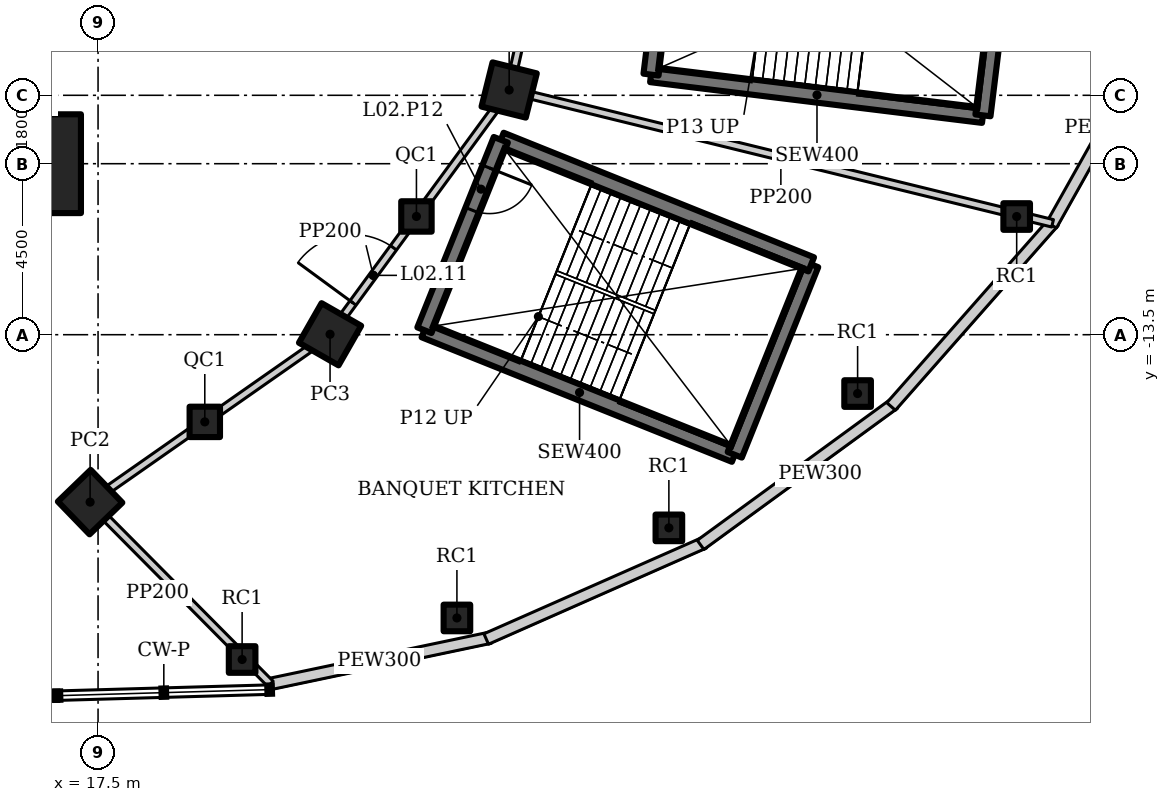
"""IFC4 building model, lengths in metres.
Left out: names, types, materials, properties, quantities, classifications, styles, units other than length and angle.
Written with IfcOpenShell. Run it as: python <this file> out.ifc"""

import sys

from ifc_helpers import new_model, si_unit, direction, frame, frame_2d, origin, origin_2d, place, context, subcontext, project, spatial, rectangle, hollow_rectangle, extrude, element, fill, save


model = new_model("IFC4")
c1 = context("Model", 3, precision=1e-05, world=origin(), true_north=direction((0.0, 1.0)))
c2 = subcontext(c1, "Body", "Model", "MODEL_VIEW")
j1 = project(units=[si_unit("LENGTHUNIT", "METRE"), si_unit("PLANEANGLEUNIT", "RADIAN")], contexts=[c1])
p1 = place(None, origin())
s1 = spatial("IfcSite", under=j1, at=p1, CompositionType="ELEMENT")
p2 = place(p1, origin())
s2 = spatial("IfcBuilding", under=s1, at=p2, CompositionType="ELEMENT")
p3 = place(p2, frame((0.0, 0.0, 14.5)))
s3 = spatial("IfcBuildingStorey", under=s2, at=p3, CompositionType="ELEMENT", Elevation=14.5)
p4 = place(p3, frame((15.75, -9.0, 0.0), z_axis=(0.0, 0.0, 1.0), x_axis=(1.0, 0.0, 0.0)))
e1 = element("IfcColumn", 1, at=p4, inside=s3, PredefinedType="COLUMN", context=c2, shape_type="SweptSolid", body=[
    extrude(hollow_rectangle(XDim=2.6, YDim=2.6, WallThickness=0.13, at=origin_2d()), origin(), (0.0, 0.0, 1.0), 7.5),
])
p5 = place(p3, frame((17.291, -17.905, 0.0), z_axis=(0.0, 0.0, 1.0), x_axis=(0.719339800339, 0.694658370459, 0.0)))
e2 = element("IfcColumn", 2, at=p5, inside=s3, PredefinedType="COLUMN", context=c2, shape_type="SweptSolid", body=[
    extrude(hollow_rectangle(XDim=1.2, YDim=1.2, WallThickness=0.1, at=origin_2d()), origin(), (0.0, 0.0, 1.0), 7.5),
])
p6 = place(p3, frame((23.605, -13.489, 0.0), z_axis=(0.0, 0.0, 1.0), x_axis=(0.496139221777, 0.86824298017, 0.0)))
e3 = element("IfcColumn", 3, at=p6, inside=s3, PredefinedType="COLUMN", context=c2, shape_type="SweptSolid", body=[
    extrude(hollow_rectangle(XDim=1.2, YDim=1.2, WallThickness=0.12, at=origin_2d()), origin(), (0.0, 0.0, 1.0), 7.5),
])
p7 = place(p3, frame((28.318, -7.06, 0.0), z_axis=(0.0, 0.0, 1.0), x_axis=(0.2419218956, 0.970295726276, 0.0)))
e4 = element("IfcColumn", 4, at=p7, inside=s3, PredefinedType="COLUMN", context=c2, shape_type="SweptSolid", body=[
    extrude(hollow_rectangle(XDim=1.2, YDim=1.2, WallThickness=0.1, at=origin_2d()), origin(), (0.0, 0.0, 1.0), 7.5),
])
for number, where, z_axis, x_axis in (
    (5, (20.309, -15.794, 0.0), (0.0, 0.0, 1.0), (1.0, 0.0, 0.0)),
    (6, (25.878, -10.388, 0.0), (0.0, 0.0, 1.0), (1.0, 0.0, 0.0)),
):
    element("IfcColumn", number, at=place(p3, frame(where, z_axis=z_axis, x_axis=x_axis)), inside=s3, PredefinedType="COLUMN", context=c2, shape_type="SweptSolid", body=[
        extrude(hollow_rectangle(XDim=0.8, YDim=0.8, WallThickness=0.05, at=origin_2d()), origin(), (0.0, 0.0, 1.0), 7.5),
    ])
for number, where, z_axis, x_axis in (
    (7, (26.943, -20.954, 0.0), (0.0, 0.0, 1.0), (1.0, 0.0, 0.0)),
    (8, (37.487, -15.049, 0.0), (0.0, 0.0, 1.0), (1.0, 0.0, 0.0)),
    (9, (21.291, -22.047, 0.0), (0.0, 0.0, 1.0), (1.0, 0.0, 0.0)),
    (10, (32.521, -18.583, 0.0), (0.0, 0.0, 1.0), (1.0, 0.0, 0.0)),
    (11, (41.672, -10.39, 0.0), (0.0, 0.0, 1.0), (1.0, 0.0, 0.0)),
):
    element("IfcColumn", number, at=place(p3, frame(where, z_axis=z_axis, x_axis=x_axis)), inside=s3, PredefinedType="COLUMN", context=c2, shape_type="SweptSolid", body=[
        extrude(hollow_rectangle(XDim=0.7, YDim=0.7, WallThickness=0.04, at=origin_2d()), origin(), (0.0, 0.0, 1.0), 7.5),
    ])
p8 = place(p3, frame((21.985, -22.7, 0.0), z_axis=(0.0, 0.0, 1.0), x_axis=(0.978625319268, 0.205651366364, 0.0)))
e12 = element("IfcWall", 12, at=p8, inside=s3, PredefinedType="SOLIDWALL", context=c2, shape_type="SweptSolid", body=[
    extrude(rectangle(XDim=5.962, YDim=0.3, at=frame_2d((2.981, 0.0))), origin(), (0.0, 0.0, 1.0), 7.3),
])
p9 = place(p3, frame((27.714, -21.508, 0.0), z_axis=(0.0, 0.0, 1.0), x_axis=(0.914855209389, 0.403782052416, 0.0)))
e13 = element("IfcWall", 13, at=p9, inside=s3, PredefinedType="SOLIDWALL", context=c2, shape_type="SweptSolid", body=[
    extrude(rectangle(XDim=6.271, YDim=0.3, at=frame_2d((3.136, 0.0))), origin(), (0.0, 0.0, 1.0), 7.3),
])
p10 = place(p3, frame((33.355, -19.031, 0.0), z_axis=(0.0, 0.0, 1.0), x_axis=(0.807898511933, 0.589321639189, 0.0)))
e14 = element("IfcWall", 14, at=p10, inside=s3, PredefinedType="SOLIDWALL", context=c2, shape_type="SweptSolid", body=[
    extrude(rectangle(XDim=6.309, YDim=0.3, at=frame_2d((3.154, 0.0))), origin(), (0.0, 0.0, 1.0), 7.3),
])
p11 = place(p3, frame((38.368, -15.389, 0.0), z_axis=(0.0, 0.0, 1.0), x_axis=(0.661196672464, 0.75021261008, 0.0)))
e15 = element("IfcWall", 15, at=p11, inside=s3, PredefinedType="SOLIDWALL", context=c2, shape_type="SweptSolid", body=[
    extrude(rectangle(XDim=6.481, YDim=0.3, at=frame_2d((3.24, 0.0))), origin(), (0.0, 0.0, 1.0), 7.3),
])
p12 = place(p3, frame((42.589, -10.618, 0.0), z_axis=(0.0, 0.0, 1.0), x_axis=(0.489563544979, 0.871967622924, 0.0)))
e16 = element("IfcWall", 16, at=p12, inside=s3, PredefinedType="SOLIDWALL", context=c2, shape_type="SweptSolid", body=[
    extrude(rectangle(XDim=5.883, YDim=0.3, at=frame_2d((2.941, 0.0))), origin(), (0.0, 0.0, 1.0), 7.3),
])
p13 = place(p3, frame((17.291, -17.905, 0.0), z_axis=(0.0, 0.0, 1.0), x_axis=(0.819431174801, 0.573177590075, 0.0)))
e17 = element("IfcWall", 17, at=p13, inside=s3, PredefinedType="SOLIDWALL", context=c2, shape_type="SweptSolid", body=[
    extrude(rectangle(XDim=3.683, YDim=0.2, at=frame_2d((1.842, 0.0))), origin(), (0.0, 0.0, 1.0), 6.896),
])
p14 = place(p3, frame((20.309, -15.794, 0.0), z_axis=(0.0, 0.0, 1.0), x_axis=(0.81942291701, 0.57318939547, 0.0)))
e18 = element("IfcWall", 18, at=p14, inside=s3, PredefinedType="SOLIDWALL", context=c2, shape_type="SweptSolid", body=[
    extrude(rectangle(XDim=4.022, YDim=0.2, at=frame_2d((2.011, 0.0))), origin(), (0.0, 0.0, 1.0), 5.8),
])
p15 = place(p3, frame((23.605, -13.489, 0.0), z_axis=(0.0, 0.0, 1.0), x_axis=(0.591286566758, 0.806461527893, 0.0)))
e19 = element("IfcWall", 19, at=p15, inside=s3, PredefinedType="SOLIDWALL", context=c2, shape_type="SweptSolid", body=[
    extrude(rectangle(XDim=3.844, YDim=0.2, at=frame_2d((1.922, 0.0))), origin(), (0.0, 0.0, 1.0), 6.896),
])
p16 = place(p15, frame((1.022, 0.0, 0.0)))
e20 = element("IfcOpeningElement", 20, at=p16, cuts=e19, PredefinedType="OPENING", context=c2, shape_type="SweptSolid", body=[
    extrude(rectangle(XDim=1.8, YDim=2.4, at=frame_2d((0.9, 1.2))), frame((0.0, 0.11, 0.0), z_axis=(0.0, -1.0, 0.0), x_axis=(1.0, 0.0, 0.0)), (0.0, 0.0, 1.0), 0.22),
])
p17 = place(p3, frame((25.878, -10.388, 0.0), z_axis=(0.0, 0.0, 1.0), x_axis=(0.591255937291, 0.806483984105, 0.0)))
e21 = element("IfcWall", 21, at=p17, inside=s3, PredefinedType="SOLIDWALL", context=c2, shape_type="SweptSolid", body=[
    extrude(rectangle(XDim=4.127, YDim=0.2, at=frame_2d((2.063, 0.0))), origin(), (0.0, 0.0, 1.0), 5.8),
])
p18 = place(p3, frame((28.318, -7.06, 0.0), z_axis=(0.0, 0.0, 1.0), x_axis=(0.218673326171, 0.97579812278, 0.0)))
e22 = element("IfcWall", 22, at=p18, inside=s3, PredefinedType="SOLIDWALL", context=c2, shape_type="SweptSolid", body=[
    extrude(rectangle(XDim=3.574, YDim=0.2, at=frame_2d((1.787, 0.0))), origin(), (0.0, 0.0, 1.0), 6.896),
])
p19 = place(p3, frame((17.291, -17.905, 0.0), z_axis=(0.0, 0.0, 1.0), x_axis=(0.704348079756, -0.709854761585, 0.0)))
e23 = element("IfcWall", 23, at=p19, inside=s3, PredefinedType="SOLIDWALL", context=c2, shape_type="SweptSolid", body=[
    extrude(rectangle(XDim=6.739, YDim=0.2, at=frame_2d((3.37, 0.0))), origin(), (0.0, 0.0, 1.0), 6.698),
])
p20 = place(p3, frame((28.318, -7.06, 0.0), z_axis=(0.0, 0.0, 1.0), x_axis=(0.971190644534, -0.238303864783, 0.0)))
e24 = element("IfcWall", 24, at=p20, inside=s3, PredefinedType="SOLIDWALL", context=c2, shape_type="SweptSolid", body=[
    extrude(rectangle(XDim=14.723, YDim=0.2, at=frame_2d((7.361, 0.0))), origin(), (0.0, 0.0, 1.0), 5.8),
])
p21 = place(p3, frame((26.087, -13.382, 0.0), z_axis=(0.0, 0.0, 1.0), x_axis=(0.92801678004, -0.372538395288, 0.0)))
e25 = element("IfcWall", 25, at=p21, inside=s3, PredefinedType="SHEAR", context=c2, shape_type="SweptSolid", body=[
    extrude(rectangle(XDim=8.8, YDim=0.4, at=frame_2d((4.4, 0.0))), origin(), (0.0, 0.0, 1.0), 7.5),
])
p22 = place(p3, frame((34.253, -16.66, 0.0), z_axis=(0.0, 0.0, 1.0), x_axis=(0.372544066459, 0.928014503414, 0.0)))
e26 = element("IfcWall", 26, at=p22, inside=s3, PredefinedType="SHEAR", context=c2, shape_type="SweptSolid", body=[
    extrude(rectangle(XDim=5.4, YDim=0.4, at=frame_2d((2.7, 0.0))), origin(), (0.0, 0.0, 1.0), 7.5),
])
p23 = place(p3, frame((36.265, -11.649, 0.0), z_axis=(0.0, 0.0, 1.0), x_axis=(-0.928007188331, 0.372562287955, 0.0)))
e27 = element("IfcWall", 27, at=p23, inside=s3, PredefinedType="SHEAR", context=c2, shape_type="SweptSolid", body=[
    extrude(rectangle(XDim=8.8, YDim=0.4, at=frame_2d((4.4, 0.0))), origin(), (0.0, 0.0, 1.0), 7.5),
])
p24 = place(p3, frame((28.099, -8.37, 0.0), z_axis=(0.0, 0.0, 1.0), x_axis=(-0.372528436202, -0.928020777904, 0.0)))
e28 = element("IfcWall", 28, at=p24, inside=s3, PredefinedType="SHEAR", context=c2, shape_type="SweptSolid", body=[
    extrude(rectangle(XDim=5.4, YDim=0.4, at=frame_2d((2.7, 0.0))), origin(), (0.0, 0.0, 1.0), 7.5),
])
p25 = place(p24, frame((0.8, 0.0, 0.0)))
e29 = element("IfcOpeningElement", 29, at=p25, cuts=e28, PredefinedType="OPENING", context=c2, shape_type="SweptSolid", body=[
    extrude(rectangle(XDim=1.2, YDim=2.1, at=frame_2d((0.6, 1.05))), frame((0.0, 0.21, 0.0), z_axis=(0.0, -1.0, 0.0), x_axis=(1.0, 0.0, 0.0)), (0.0, 0.0, 1.0), 0.42),
])
p26 = place(p3, frame((32.051, -6.656, 0.0), z_axis=(0.0, 0.0, 1.0), x_axis=(0.992545280606, -0.121876437212, 0.0)))
e30 = element("IfcWall", 30, at=p26, inside=s3, PredefinedType="SHEAR", context=c2, shape_type="SweptSolid", body=[
    extrude(rectangle(XDim=8.8, YDim=0.4, at=frame_2d((4.4, 0.0))), origin(), (0.0, 0.0, 1.0), 7.5),
])
p27 = place(p3, frame((40.785, -7.728, 0.0), z_axis=(0.0, 0.0, 1.0), x_axis=(0.121892082937, 0.992543359314, 0.0)))
e31 = element("IfcWall", 31, at=p27, inside=s3, PredefinedType="SHEAR", context=c2, shape_type="SweptSolid", body=[
    extrude(rectangle(XDim=5.4, YDim=0.4, at=frame_2d((2.7, 0.0))), origin(), (0.0, 0.0, 1.0), 7.5),
])
p28 = place(p3, frame((32.708, -1.296, 0.0), z_axis=(0.0, 0.0, 1.0), x_axis=(-0.12184754212, -0.99254882826, 0.0)))
e32 = element("IfcWall", 32, at=p28, inside=s3, PredefinedType="SHEAR", context=c2, shape_type="SweptSolid", body=[
    extrude(rectangle(XDim=5.4, YDim=0.4, at=frame_2d((2.7, 0.0))), origin(), (0.0, 0.0, 1.0), 7.5),
])
p29 = place(p28, frame((0.8, 0.0, 0.0)))
e33 = element("IfcOpeningElement", 33, at=p29, cuts=e32, PredefinedType="OPENING", context=c2, shape_type="SweptSolid", body=[
    extrude(rectangle(XDim=1.2, YDim=2.1, at=frame_2d((0.6, 1.05))), frame((0.0, 0.21, 0.0), z_axis=(0.0, -1.0, 0.0), x_axis=(1.0, 0.0, 0.0)), (0.0, 0.0, 1.0), 0.42),
])
p30 = place(p16, origin())
e34 = element("IfcDoor", 34, at=p30, inside=s3, OperationType="DOUBLE_DOOR_DOUBLE_SWING", PredefinedType="DOOR", context=c2, shape_type="SweptSolid", body=[
    extrude(rectangle(XDim=1.8, YDim=2.4, at=frame_2d((0.9, 1.2))), frame((0.0, 0.025, 0.0), z_axis=(0.0, -1.0, 0.0), x_axis=(1.0, 0.0, 0.0)), (0.0, 0.0, 1.0), 0.05),
])
fill(e20, e34)
p31 = place(p25, origin())
e35 = element("IfcDoor", 35, at=p31, inside=s3, OperationType="SINGLE_SWING_RIGHT", PredefinedType="DOOR", context=c2, shape_type="SweptSolid", body=[
    extrude(rectangle(XDim=1.2, YDim=2.1, at=frame_2d((0.6, 1.05))), frame((0.0, 0.025, 0.0), z_axis=(0.0, -1.0, 0.0), x_axis=(1.0, 0.0, 0.0)), (0.0, 0.0, 1.0), 0.05),
])
fill(e29, e35)
save(model, sys.argv[1])
